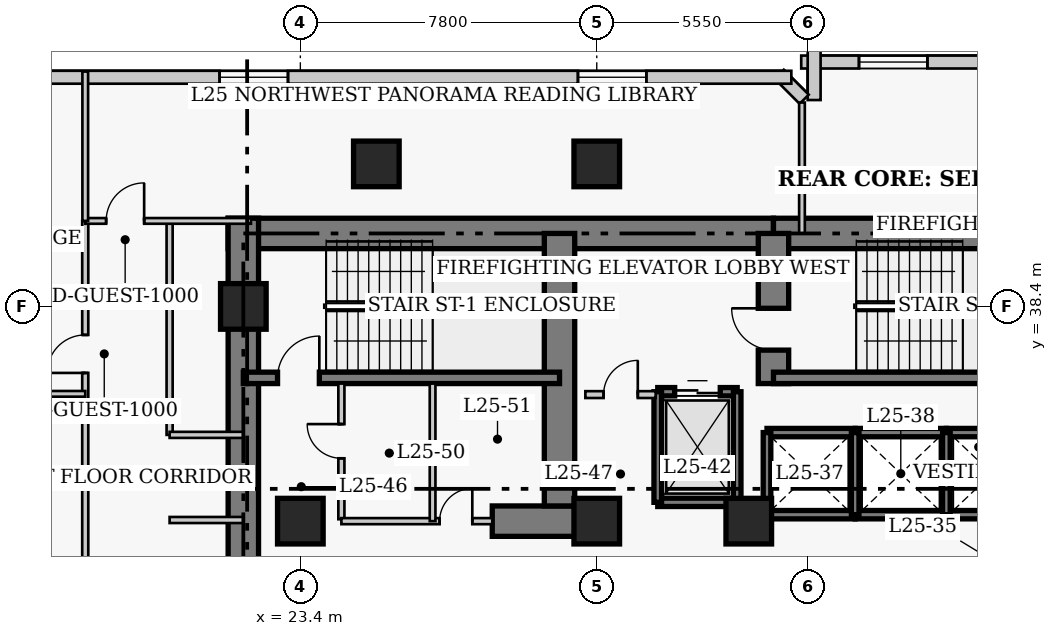
"""IFC4 building model, lengths in metres.
Left out: names, types, materials, properties, quantities, classifications, styles, units other than length and angle.
Written with IfcOpenShell. Run it as: python <this file> out.ifc"""

import sys

from ifc_helpers import new_model, si_unit, direction, frame, frame_2d, origin, origin_2d, place, context, subcontext, project, spatial, rectangle, extrude, element, fill, save


model = new_model("IFC4")
c1 = context("Model", 3, precision=1e-05, world=origin(), true_north=direction((0.0, 1.0)))
c2 = subcontext(c1, "Body", "Model", "MODEL_VIEW")
j1 = project(units=[si_unit("LENGTHUNIT", "METRE"), si_unit("PLANEANGLEUNIT", "RADIAN")], contexts=[c1])
p1 = place(None, origin())
s1 = spatial("IfcSite", under=j1, at=p1, CompositionType="ELEMENT")
p2 = place(p1, origin())
s2 = spatial("IfcBuilding", under=s1, at=p2, CompositionType="ELEMENT")
p3 = place(p2, frame((0.0, 0.0, 103.2)))
s3 = spatial("IfcBuildingStorey", under=s2, at=p3, CompositionType="ELEMENT", Elevation=103.2)
p4 = place(p3, frame((21.5, 40.32, 0.0), z_axis=(0.0, 0.0, 1.0), x_axis=(1.0, 0.0, 0.0)))
e1 = element("IfcWall", 1, at=p4, inside=s3, PredefinedType="SHEAR", context=c2, shape_type="SweptSolid", body=[
    extrude(rectangle(XDim=14.35, YDim=0.8, at=frame_2d((7.175, 0.0))), origin(), (0.0, 0.0, 1.0), 3.8),
])
p5 = place(p3, frame((35.85, 40.32, 0.0), z_axis=(0.0, 0.0, 1.0), x_axis=(1.0, 0.0, 0.0)))
e2 = element("IfcWall", 2, at=p5, inside=s3, PredefinedType="SHEAR", context=c2, shape_type="SweptSolid", body=[
    extrude(rectangle(XDim=12.6, YDim=0.8, at=frame_2d((6.3, 0.0))), origin(), (0.0, 0.0, 1.0), 3.8),
])
p6 = place(p3, frame((21.9, 27.05, 0.0), z_axis=(0.0, 0.0, 1.0), x_axis=(0.0, 1.0, 0.0)))
e3 = element("IfcWall", 3, at=p6, inside=s3, PredefinedType="SHEAR", context=c2, shape_type="SweptSolid", body=[
    extrude(rectangle(XDim=13.67, YDim=0.8, at=frame_2d((6.835, 0.0))), origin(), (0.0, 0.0, 1.0), 3.8),
])
p7 = place(p3, frame((28.45, 32.75, 0.0), z_axis=(0.0, 0.0, 1.0), x_axis=(1.0, 0.0, 0.0)))
e4 = element("IfcWall", 4, at=p7, inside=s3, PredefinedType="SHEAR", context=c2, shape_type="SweptSolid", body=[
    extrude(rectangle(XDim=2.4, YDim=0.8, at=frame_2d((1.2, 0.0))), origin(), (0.0, 0.0, 1.0), 3.8),
])
p8 = place(p3, frame((30.22, 33.15, 0.0), z_axis=(0.0, 0.0, 1.0), x_axis=(0.0, 1.0, 0.0)))
e5 = element("IfcWall", 5, at=p8, inside=s3, PredefinedType="SHEAR", context=c2, shape_type="SweptSolid", body=[
    extrude(rectangle(XDim=7.17, YDim=0.8, at=frame_2d((3.585, 0.0))), origin(), (0.0, 0.0, 1.0), 3.8),
])
p9 = place(p3, frame((35.85, 36.37, 0.0), z_axis=(0.0, 0.0, 1.0), x_axis=(0.0, 1.0, 0.0)))
e6 = element("IfcWall", 6, at=p9, inside=s3, PredefinedType="SHEAR", context=c2, shape_type="SweptSolid", body=[
    extrude(rectangle(XDim=3.95, YDim=0.8, at=frame_2d((1.975, 0.0))), origin(), (0.0, 0.0, 1.0), 3.8),
])
p10 = place(p9, frame((0.88, 0.0, 0.0)))
e7 = element("IfcOpeningElement", 7, at=p10, cuts=e6, PredefinedType="OPENING", context=c2, shape_type="SweptSolid", body=[
    extrude(rectangle(XDim=1.1, YDim=2.15, at=frame_2d((0.55, 1.075))), frame((0.0, 0.41, 0.0), z_axis=(0.0, -1.0, 0.0), x_axis=(1.0, 0.0, 0.0)), (0.0, 0.0, 1.0), 0.82),
])
p11 = place(p3, frame((21.9, 36.52, 0.0), z_axis=(0.0, 0.0, 1.0), x_axis=(1.0, 0.0, 0.0)))
e8 = element("IfcWall", 8, at=p11, inside=s3, PredefinedType="SHEAR", context=c2, shape_type="SweptSolid", body=[
    extrude(rectangle(XDim=8.32, YDim=0.3, at=frame_2d((4.16, 0.0))), origin(), (0.0, 0.0, 1.0), 3.8),
])
p12 = place(p11, frame((0.9, 0.0, 0.0)))
e9 = element("IfcOpeningElement", 9, at=p12, cuts=e8, PredefinedType="OPENING", context=c2, shape_type="SweptSolid", body=[
    extrude(rectangle(XDim=1.1, YDim=2.15, at=frame_2d((0.55, 1.075))), frame((0.0, 0.16, 0.0), z_axis=(0.0, -1.0, 0.0), x_axis=(1.0, 0.0, 0.0)), (0.0, 0.0, 1.0), 0.32),
])
p13 = place(p3, frame((35.85, 36.52, 0.0), z_axis=(0.0, 0.0, 1.0), x_axis=(1.0, 0.0, 0.0)))
e10 = element("IfcWall", 10, at=p13, inside=s3, PredefinedType="SHEAR", context=c2, shape_type="SweptSolid", body=[
    extrude(rectangle(XDim=8.33, YDim=0.3, at=frame_2d((4.165, 0.0))), origin(), (0.0, 0.0, 1.0), 3.8),
])
for number, where, z_axis, x_axis in (
    (11, (21.9, 38.4, 0.0), (0.0, 0.0, 1.0), (1.0, 0.0, 0.0)),
    (12, (23.4, 32.75, 0.0), (0.0, 0.0, 1.0), (1.0, 0.0, 0.0)),
    (13, (31.2, 32.75, 0.0), (0.0, 0.0, 1.0), (1.0, 0.0, 0.0)),
    (14, (35.2, 32.75, 0.0), (0.0, 0.0, 1.0), (1.0, 0.0, 0.0)),
    (15, (25.4, 42.15, 0.0), (0.0, 0.0, 1.0), (1.0, 0.0, 0.0)),
    (16, (31.2, 42.15, 0.0), (0.0, 0.0, 1.0), (1.0, 0.0, 0.0)),
):
    element("IfcColumn", number, at=place(p3, frame(where, z_axis=z_axis, x_axis=x_axis)), inside=s3, PredefinedType="COLUMN", context=c2, shape_type="SweptSolid", body=[
        extrude(rectangle(XDim=1.2, YDim=1.2, at=origin_2d()), origin(), (0.0, 0.0, 1.0), 3.8),
    ])
p14 = place(p3, frame((41.42, 44.83, 0.0), z_axis=(0.0, 0.0, 1.0), x_axis=(-1.0, 0.0, 0.0)))
e17 = element("IfcWall", 17, at=p14, inside=s3, PredefinedType="SOLIDWALL", context=c2, shape_type="SweptSolid", body=[
    extrude(rectangle(XDim=4.84, YDim=0.34, at=frame_2d((2.42, 0.0))), origin(), (0.0, 0.0, 1.0), 3.54),
])
p15 = place(p14, frame((1.52, 0.0, 0.85)))
e18 = element("IfcOpeningElement", 18, at=p15, cuts=e17, PredefinedType="OPENING", context=c2, shape_type="SweptSolid", body=[
    extrude(rectangle(XDim=1.8, YDim=1.8, at=frame_2d((0.9, 0.9))), frame((0.0, 0.18, 0.0), z_axis=(0.0, -1.0, 0.0), x_axis=(1.0, 0.0, 0.0)), (0.0, 0.0, 1.0), 0.36),
])
p16 = place(p3, frame((36.92, 45.17, 0.0), z_axis=(0.0, 0.0, 1.0), x_axis=(0.0, -1.0, 0.0)))
e19 = element("IfcWall", 19, at=p16, inside=s3, PredefinedType="SOLIDWALL", context=c2, shape_type="SweptSolid", body=[
    extrude(rectangle(XDim=1.34, YDim=0.34, at=frame_2d((0.67, 0.0))), origin(), (0.0, 0.0, 1.0), 3.54),
])
p17 = place(p3, frame((36.658, 43.852, 0.0), z_axis=(0.0, 0.0, 1.0), x_axis=(-0.707238225886, 0.706975312048, 0.0)))
e20 = element("IfcWall", 20, at=p17, inside=s3, PredefinedType="SOLIDWALL", context=c2, shape_type="SweptSolid", body=[
    extrude(rectangle(XDim=0.929, YDim=0.34, at=frame_2d((0.464, 0.0))), origin(), (0.0, 0.0, 1.0), 3.54),
])
p18 = place(p3, frame((36.32, 44.43, 0.0), z_axis=(0.0, 0.0, 1.0), x_axis=(-1.0, 0.0, 0.0)))
e21 = element("IfcWall", 21, at=p18, inside=s3, PredefinedType="SOLIDWALL", context=c2, shape_type="SweptSolid", body=[
    extrude(rectangle(XDim=28.29, YDim=0.34, at=frame_2d((14.145, 0.0))), origin(), (0.0, 0.0, 1.0), 3.54),
])
p19 = place(p18, frame((3.815, 0.0, 0.85)))
e22 = element("IfcOpeningElement", 22, at=p19, cuts=e21, PredefinedType="OPENING", context=c2, shape_type="SweptSolid", body=[
    extrude(rectangle(XDim=1.8, YDim=1.8, at=frame_2d((0.9, 0.9))), frame((0.0, 0.18, 0.0), z_axis=(0.0, -1.0, 0.0), x_axis=(1.0, 0.0, 0.0)), (0.0, 0.0, 1.0), 0.36),
])
p20 = place(p18, frame((13.245, 0.0, 0.85)))
e23 = element("IfcOpeningElement", 23, at=p20, cuts=e21, PredefinedType="OPENING", context=c2, shape_type="SweptSolid", body=[
    extrude(rectangle(XDim=1.8, YDim=1.8, at=frame_2d((0.9, 0.9))), frame((0.0, 0.18, 0.0), z_axis=(0.0, -1.0, 0.0), x_axis=(1.0, 0.0, 0.0)), (0.0, 0.0, 1.0), 0.36),
])
p21 = place(p18, frame((22.675, 0.0, 0.85)))
e24 = element("IfcOpeningElement", 24, at=p21, cuts=e21, PredefinedType="OPENING", context=c2, shape_type="SweptSolid", body=[
    extrude(rectangle(XDim=1.8, YDim=1.8, at=frame_2d((0.9, 0.9))), frame((0.0, 0.18, 0.0), z_axis=(0.0, -1.0, 0.0), x_axis=(1.0, 0.0, 0.0)), (0.0, 0.0, 1.0), 0.36),
])
for number, where, z_axis, x_axis in (
    (25, (35.68, 35.08, 0.0), (0.0, 0.0, 1.0), (1.0, 0.0, 0.0)),
    (26, (35.68, 32.92, 0.0), (0.0, 0.0, 1.0), (1.0, 0.0, 0.0)),
):
    element("IfcWall", number, at=place(p3, frame(where, z_axis=z_axis, x_axis=x_axis)), inside=s3, PredefinedType="SHEAR", context=c2, shape_type="SweptSolid", body=[
        extrude(rectangle(XDim=2.32, YDim=0.22, at=frame_2d((1.16, 0.0))), origin(), (0.0, 0.0, 1.0), 3.8),
    ])
p22 = place(p3, frame((35.68, 32.92, 0.0), z_axis=(0.0, 0.0, 1.0), x_axis=(0.0, 1.0, 0.0)))
e27 = element("IfcWall", 27, at=p22, inside=s3, PredefinedType="SHEAR", context=c2, shape_type="SweptSolid", body=[
    extrude(rectangle(XDim=2.16, YDim=0.2, at=frame_2d((1.08, 0.0))), origin(), (0.0, 0.0, 1.0), 3.8),
])
for number, where, z_axis, x_axis in (
    (28, (38.0, 35.08, 0.0), (0.0, 0.0, 1.0), (1.0, 0.0, 0.0)),
    (29, (38.0, 32.92, 0.0), (0.0, 0.0, 1.0), (1.0, 0.0, 0.0)),
):
    element("IfcWall", number, at=place(p3, frame(where, z_axis=z_axis, x_axis=x_axis)), inside=s3, PredefinedType="SHEAR", context=c2, shape_type="SweptSolid", body=[
        extrude(rectangle(XDim=2.4, YDim=0.22, at=frame_2d((1.2, 0.0))), origin(), (0.0, 0.0, 1.0), 3.8),
    ])
p23 = place(p3, frame((38.0, 32.92, 0.0), z_axis=(0.0, 0.0, 1.0), x_axis=(0.0, 1.0, 0.0)))
e30 = element("IfcWall", 30, at=p23, inside=s3, PredefinedType="SHEAR", context=c2, shape_type="SweptSolid", body=[
    extrude(rectangle(XDim=2.16, YDim=0.2, at=frame_2d((1.08, 0.0))), origin(), (0.0, 0.0, 1.0), 3.8),
])
for number, where, z_axis, x_axis in (
    (31, (40.4, 35.08, 0.0), (0.0, 0.0, 1.0), (1.0, 0.0, 0.0)),
    (32, (40.4, 32.92, 0.0), (0.0, 0.0, 1.0), (1.0, 0.0, 0.0)),
):
    element("IfcWall", number, at=place(p3, frame(where, z_axis=z_axis, x_axis=x_axis)), inside=s3, PredefinedType="SHEAR", context=c2, shape_type="SweptSolid", body=[
        extrude(rectangle(XDim=2.32, YDim=0.22, at=frame_2d((1.16, 0.0))), origin(), (0.0, 0.0, 1.0), 3.8),
    ])
p24 = place(p3, frame((40.4, 32.92, 0.0), z_axis=(0.0, 0.0, 1.0), x_axis=(0.0, 1.0, 0.0)))
e33 = element("IfcWall", 33, at=p24, inside=s3, PredefinedType="SHEAR", context=c2, shape_type="SweptSolid", body=[
    extrude(rectangle(XDim=2.16, YDim=0.2, at=frame_2d((1.08, 0.0))), origin(), (0.0, 0.0, 1.0), 3.8),
])
p25 = place(p3, frame((32.805, 36.155, 0.0), z_axis=(0.0, 0.0, 1.0), x_axis=(1.0, 0.0, 0.0)))
e34 = element("IfcWall", 34, at=p25, inside=s3, PredefinedType="SHEAR", context=c2, shape_type="SweptSolid", body=[
    extrude(rectangle(XDim=2.09, YDim=0.22, at=frame_2d((1.045, 0.0))), origin(), (0.0, 0.0, 1.0), 3.8),
])
p26 = place(p25, frame((0.445, 0.0, 0.0)))
e35 = element("IfcOpeningElement", 35, at=p26, cuts=e34, PredefinedType="OPENING", context=c2, shape_type="SweptSolid", body=[
    extrude(rectangle(XDim=1.2, YDim=2.15, at=frame_2d((0.6, 1.075))), frame((0.0, 0.12, 0.0), z_axis=(0.0, -1.0, 0.0), x_axis=(1.0, 0.0, 0.0)), (0.0, 0.0, 1.0), 0.24),
])
p27 = place(p3, frame((32.805, 33.245, 0.0), z_axis=(0.0, 0.0, 1.0), x_axis=(1.0, 0.0, 0.0)))
e36 = element("IfcWall", 36, at=p27, inside=s3, PredefinedType="SHEAR", context=c2, shape_type="SweptSolid", body=[
    extrude(rectangle(XDim=2.09, YDim=0.22, at=frame_2d((1.045, 0.0))), origin(), (0.0, 0.0, 1.0), 3.8),
])
for number, where, z_axis, x_axis in (
    (37, (32.805, 33.245, 0.0), (0.0, 0.0, 1.0), (0.0, 1.0, 0.0)),
    (38, (34.895, 33.245, 0.0), (0.0, 0.0, 1.0), (0.0, 1.0, 0.0)),
):
    element("IfcWall", number, at=place(p3, frame(where, z_axis=z_axis, x_axis=x_axis)), inside=s3, PredefinedType="SHEAR", context=c2, shape_type="SweptSolid", body=[
        extrude(rectangle(XDim=2.91, YDim=0.2, at=frame_2d((1.455, 0.0))), origin(), (0.0, 0.0, 1.0), 3.8),
    ])
p28 = place(p3, frame((30.9, 36.08, 0.0), z_axis=(0.0, 0.0, 1.0), x_axis=(1.0, 0.0, 0.0)))
e39 = element("IfcWall", 39, at=p28, inside=s3, PredefinedType="PARTITIONING", context=c2, shape_type="SweptSolid", body=[
    extrude(rectangle(XDim=1.85, YDim=0.18, at=frame_2d((0.925, 0.0))), origin(), (0.0, 0.0, 1.0), 3.54),
])
p29 = place(p28, frame((0.48, 0.0, 0.0)))
e40 = element("IfcOpeningElement", 40, at=p29, cuts=e39, PredefinedType="OPENING", context=c2, shape_type="SweptSolid", body=[
    extrude(rectangle(XDim=0.9, YDim=2.15, at=frame_2d((0.45, 1.075))), frame((0.0, 0.1, 0.0), z_axis=(0.0, -1.0, 0.0), x_axis=(1.0, 0.0, 0.0)), (0.0, 0.0, 1.0), 0.2),
])
p30 = place(p3, frame((24.48, 32.8, 0.0), z_axis=(0.0, 0.0, 1.0), x_axis=(0.0, 1.0, 0.0)))
e41 = element("IfcWall", 41, at=p30, inside=s3, PredefinedType="PARTITIONING", context=c2, shape_type="SweptSolid", body=[
    extrude(rectangle(XDim=3.57, YDim=0.16, at=frame_2d((1.785, 0.0))), origin(), (0.0, 0.0, 1.0), 3.54),
])
p31 = place(p30, frame((1.604, 0.0, 0.0)))
e42 = element("IfcOpeningElement", 42, at=p31, cuts=e41, PredefinedType="OPENING", context=c2, shape_type="SweptSolid", body=[
    extrude(rectangle(XDim=0.9, YDim=2.1, at=frame_2d((0.45, 1.05))), frame((0.0, 0.09, 0.0), z_axis=(0.0, -1.0, 0.0), x_axis=(1.0, 0.0, 0.0)), (0.0, 0.0, 1.0), 0.18),
])
p32 = place(p3, frame((24.48, 32.75, 0.0), z_axis=(0.0, 0.0, 1.0), x_axis=(1.0, 0.0, 0.0)))
e43 = element("IfcWall", 43, at=p32, inside=s3, PredefinedType="PARTITIONING", context=c2, shape_type="SweptSolid", body=[
    extrude(rectangle(XDim=3.97, YDim=0.16, at=frame_2d((1.985, 0.0))), origin(), (0.0, 0.0, 1.0), 3.54),
])
p33 = place(p32, frame((2.585, 0.0, 0.0)))
e44 = element("IfcOpeningElement", 44, at=p33, cuts=e43, PredefinedType="OPENING", context=c2, shape_type="SweptSolid", body=[
    extrude(rectangle(XDim=0.86, YDim=2.05, at=frame_2d((0.43, 1.025))), frame((0.0, 0.09, 0.0), z_axis=(0.0, -1.0, 0.0), x_axis=(1.0, 0.0, 0.0)), (0.0, 0.0, 1.0), 0.18),
])
p34 = place(p3, frame((26.88, 32.75, 0.0), z_axis=(0.0, 0.0, 1.0), x_axis=(0.0, 1.0, 0.0)))
e45 = element("IfcWall", 45, at=p34, inside=s3, PredefinedType="PARTITIONING", context=c2, shape_type="SweptSolid", body=[
    extrude(rectangle(XDim=3.62, YDim=0.15, at=frame_2d((1.81, 0.0))), origin(), (0.0, 0.0, 1.0), 3.54),
])
p35 = place(p3, frame((17.74, 6.65, 0.0), z_axis=(0.0, 0.0, 1.0), x_axis=(0.0, 1.0, 0.0)))
e46 = element("IfcWall", 46, at=p35, inside=s3, PredefinedType="PARTITIONING", context=c2, shape_type="SweptSolid", body=[
    extrude(rectangle(XDim=34.0, YDim=0.16, at=frame_2d((17.0, 0.0))), origin(), (0.0, 0.0, 1.0), 3.54),
])
p36 = place(p35, frame((1.8, 0.0, 0.0)))
e47 = element("IfcOpeningElement", 47, at=p36, cuts=e46, PredefinedType="OPENING", context=c2, shape_type="SweptSolid", body=[
    extrude(rectangle(XDim=0.95, YDim=2.1, at=frame_2d((0.475, 1.05))), frame((0.0, 0.09, 0.0), z_axis=(0.0, -1.0, 0.0), x_axis=(1.0, 0.0, 0.0)), (0.0, 0.0, 1.0), 0.18),
])
p37 = place(p35, frame((8.475, 0.0, 0.0)))
e48 = element("IfcOpeningElement", 48, at=p37, cuts=e46, PredefinedType="OPENING", context=c2, shape_type="SweptSolid", body=[
    extrude(rectangle(XDim=0.95, YDim=2.1, at=frame_2d((0.475, 1.05))), frame((0.0, 0.09, 0.0), z_axis=(0.0, -1.0, 0.0), x_axis=(1.0, 0.0, 0.0)), (0.0, 0.0, 1.0), 0.18),
])
p38 = place(p35, frame((14.255, 0.0, 0.0)))
e49 = element("IfcOpeningElement", 49, at=p38, cuts=e46, PredefinedType="OPENING", context=c2, shape_type="SweptSolid", body=[
    extrude(rectangle(XDim=0.95, YDim=2.1, at=frame_2d((0.475, 1.05))), frame((0.0, 0.09, 0.0), z_axis=(0.0, -1.0, 0.0), x_axis=(1.0, 0.0, 0.0)), (0.0, 0.0, 1.0), 0.18),
])
p39 = place(p35, frame((30.0, 0.0, 0.0)))
e50 = element("IfcOpeningElement", 50, at=p39, cuts=e46, PredefinedType="OPENING", context=c2, shape_type="SweptSolid", body=[
    extrude(rectangle(XDim=1.0, YDim=2.15, at=frame_2d((0.5, 1.075))), frame((0.0, 0.09, 0.0), z_axis=(0.0, -1.0, 0.0), x_axis=(1.0, 0.0, 0.0)), (0.0, 0.0, 1.0), 0.18),
])
p40 = place(p3, frame((19.96, 35.02, 0.0), z_axis=(0.0, 0.0, 1.0), x_axis=(0.0, 1.0, 0.0)))
e51 = element("IfcWall", 51, at=p40, inside=s3, PredefinedType="PARTITIONING", context=c2, shape_type="SweptSolid", body=[
    extrude(rectangle(XDim=5.63, YDim=0.16, at=frame_2d((2.815, 0.0))), origin(), (0.0, 0.0, 1.0), 3.54),
])
for number, where, z_axis, x_axis in (
    (52, (19.96, 35.02, 0.0), (0.0, 0.0, 1.0), (1.0, 0.0, 0.0)),
    (53, (19.96, 32.78, 0.0), (0.0, 0.0, 1.0), (1.0, 0.0, 0.0)),
):
    element("IfcWall", number, at=place(p3, frame(where, z_axis=z_axis, x_axis=x_axis)), inside=s3, PredefinedType="PARTITIONING", context=c2, shape_type="SweptSolid", body=[
        extrude(rectangle(XDim=1.94, YDim=0.16, at=frame_2d((0.97, 0.0))), origin(), (0.0, 0.0, 1.0), 3.54),
    ])
p41 = place(p3, frame((17.74, 40.65, 0.0), z_axis=(0.0, 0.0, 1.0), x_axis=(1.0, 0.0, 0.0)))
e54 = element("IfcWall", 54, at=p41, inside=s3, PredefinedType="PARTITIONING", context=c2, shape_type="SweptSolid", body=[
    extrude(rectangle(XDim=4.36, YDim=0.15, at=frame_2d((2.18, 0.0))), origin(), (0.0, 0.0, 1.0), 3.54),
])
p42 = place(p41, frame((0.55, 0.0, 0.0)))
e55 = element("IfcOpeningElement", 55, at=p42, cuts=e54, PredefinedType="OPENING", context=c2, shape_type="SweptSolid", body=[
    extrude(rectangle(XDim=1.0, YDim=2.15, at=frame_2d((0.5, 1.075))), frame((0.0, 0.085, 0.0), z_axis=(0.0, -1.0, 0.0), x_axis=(1.0, 0.0, 0.0)), (0.0, 0.0, 1.0), 0.17),
])
p43 = place(p3, frame((17.74, 40.65, 0.0), z_axis=(0.0, 0.0, 1.0), x_axis=(0.0, 1.0, 0.0)))
e56 = element("IfcWall", 56, at=p43, inside=s3, PredefinedType="PARTITIONING", context=c2, shape_type="SweptSolid", body=[
    extrude(rectangle(XDim=3.93, YDim=0.15, at=frame_2d((1.965, 0.0))), origin(), (0.0, 0.0, 1.0), 3.54),
])
p44 = place(p3, frame((36.6, 40.32, 0.0), z_axis=(0.0, 0.0, 1.0), x_axis=(0.0, 1.0, 0.0)))
e57 = element("IfcWall", 57, at=p44, inside=s3, PredefinedType="PARTITIONING", context=c2, shape_type="SweptSolid", body=[
    extrude(rectangle(XDim=3.445, YDim=0.15, at=frame_2d((1.723, 0.0))), origin(), (0.0, 0.0, 1.0), 3.54),
])
p45 = place(p3, frame((14.45, 36.1, 0.0), z_axis=(0.0, 0.0, 1.0), x_axis=(1.0, 0.0, 0.0)))
e58 = element("IfcWall", 58, at=p45, inside=s3, PredefinedType="PARTITIONING", context=c2, shape_type="SweptSolid", body=[
    extrude(rectangle(XDim=3.29, YDim=0.15, at=frame_2d((1.645, 0.0))), origin(), (0.0, 0.0, 1.0), 3.54),
])
p46 = place(p15, origin())
e59 = element("IfcWindow", 59, at=p46, inside=s3, PartitioningType="SINGLE_PANEL", PredefinedType="WINDOW", context=c2, shape_type="SweptSolid", body=[
    extrude(rectangle(XDim=1.8, YDim=1.8, at=frame_2d((0.9, 0.9))), frame((0.0, 0.03, 0.0), z_axis=(0.0, -1.0, 0.0), x_axis=(1.0, 0.0, 0.0)), (0.0, 0.0, 1.0), 0.06),
])
fill(e18, e59)
p47 = place(p19, origin())
e60 = element("IfcWindow", 60, at=p47, inside=s3, PartitioningType="SINGLE_PANEL", PredefinedType="WINDOW", context=c2, shape_type="SweptSolid", body=[
    extrude(rectangle(XDim=1.8, YDim=1.8, at=frame_2d((0.9, 0.9))), frame((0.0, 0.03, 0.0), z_axis=(0.0, -1.0, 0.0), x_axis=(1.0, 0.0, 0.0)), (0.0, 0.0, 1.0), 0.06),
])
fill(e22, e60)
p48 = place(p20, origin())
e61 = element("IfcWindow", 61, at=p48, inside=s3, PartitioningType="SINGLE_PANEL", PredefinedType="WINDOW", context=c2, shape_type="SweptSolid", body=[
    extrude(rectangle(XDim=1.8, YDim=1.8, at=frame_2d((0.9, 0.9))), frame((0.0, 0.03, 0.0), z_axis=(0.0, -1.0, 0.0), x_axis=(1.0, 0.0, 0.0)), (0.0, 0.0, 1.0), 0.06),
])
fill(e23, e61)
p49 = place(p26, origin())
e62 = element("IfcDoor", 62, at=p49, inside=s3, OperationType="DOUBLE_DOOR_SLIDING", PredefinedType="DOOR", context=c2, shape_type="SweptSolid", body=[
    extrude(rectangle(XDim=1.2, YDim=2.15, at=frame_2d((0.6, 1.075))), frame((0.0, 0.025, 0.0), z_axis=(0.0, -1.0, 0.0), x_axis=(1.0, 0.0, 0.0)), (0.0, 0.0, 1.0), 0.05),
])
fill(e35, e62)
p50 = place(p29, origin())
e63 = element("IfcDoor", 63, at=p50, inside=s3, OperationType="SINGLE_SWING_RIGHT", PredefinedType="DOOR", context=c2, shape_type="SweptSolid", body=[
    extrude(rectangle(XDim=0.9, YDim=2.15, at=frame_2d((0.45, 1.075))), frame((0.0, 0.025, 0.0), z_axis=(0.0, -1.0, 0.0), x_axis=(1.0, 0.0, 0.0)), (0.0, 0.0, 1.0), 0.05),
])
fill(e40, e63)
p51 = place(p31, origin())
e64 = element("IfcDoor", 64, at=p51, inside=s3, OperationType="SINGLE_SWING_RIGHT", PredefinedType="DOOR", context=c2, shape_type="SweptSolid", body=[
    extrude(rectangle(XDim=0.9, YDim=2.1, at=frame_2d((0.45, 1.05))), frame((0.0, 0.025, 0.0), z_axis=(0.0, -1.0, 0.0), x_axis=(1.0, 0.0, 0.0)), (0.0, 0.0, 1.0), 0.05),
])
fill(e42, e64)
p52 = place(p33, origin())
e65 = element("IfcDoor", 65, at=p52, inside=s3, OperationType="SINGLE_SWING_RIGHT", PredefinedType="DOOR", context=c2, shape_type="SweptSolid", body=[
    extrude(rectangle(XDim=0.86, YDim=2.05, at=frame_2d((0.43, 1.025))), frame((0.0, 0.025, 0.0), z_axis=(0.0, -1.0, 0.0), x_axis=(1.0, 0.0, 0.0)), (0.0, 0.0, 1.0), 0.05),
])
fill(e44, e65)
p53 = place(p42, origin())
e66 = element("IfcDoor", 66, at=p53, inside=s3, OperationType="SINGLE_SWING_RIGHT", PredefinedType="DOOR", context=c2, shape_type="SweptSolid", body=[
    extrude(rectangle(XDim=1.0, YDim=2.15, at=frame_2d((0.5, 1.075))), frame((0.0, 0.025, 0.0), z_axis=(0.0, -1.0, 0.0), x_axis=(1.0, 0.0, 0.0)), (0.0, 0.0, 1.0), 0.05),
])
fill(e55, e66)
p54 = place(p39, origin())
e67 = element("IfcDoor", 67, at=p54, inside=s3, OperationType="SINGLE_SWING_LEFT", PredefinedType="DOOR", context=c2, shape_type="SweptSolid", body=[
    extrude(rectangle(XDim=1.0, YDim=2.15, at=frame_2d((0.5, 1.075))), frame((0.0, 0.025, 0.0), z_axis=(0.0, -1.0, 0.0), x_axis=(1.0, 0.0, 0.0)), (0.0, 0.0, 1.0), 0.05),
])
fill(e50, e67)
p55 = place(p12, origin())
e68 = element("IfcDoor", 68, at=p55, inside=s3, OperationType="SINGLE_SWING_RIGHT", PredefinedType="DOOR", context=c2, shape_type="SweptSolid", body=[
    extrude(rectangle(XDim=1.1, YDim=2.15, at=frame_2d((0.55, 1.075))), frame((0.0, 0.025, 0.0), z_axis=(0.0, -1.0, 0.0), x_axis=(1.0, 0.0, 0.0)), (0.0, 0.0, 1.0), 0.05),
])
fill(e9, e68)
p56 = place(p10, origin())
e69 = element("IfcDoor", 69, at=p56, inside=s3, OperationType="SINGLE_SWING_RIGHT", PredefinedType="DOOR", context=c2, shape_type="SweptSolid", body=[
    extrude(rectangle(XDim=1.1, YDim=2.15, at=frame_2d((0.55, 1.075))), frame((0.0, 0.025, 0.0), z_axis=(0.0, -1.0, 0.0), x_axis=(1.0, 0.0, 0.0)), (0.0, 0.0, 1.0), 0.05),
])
fill(e7, e69)
save(model, sys.argv[1])
